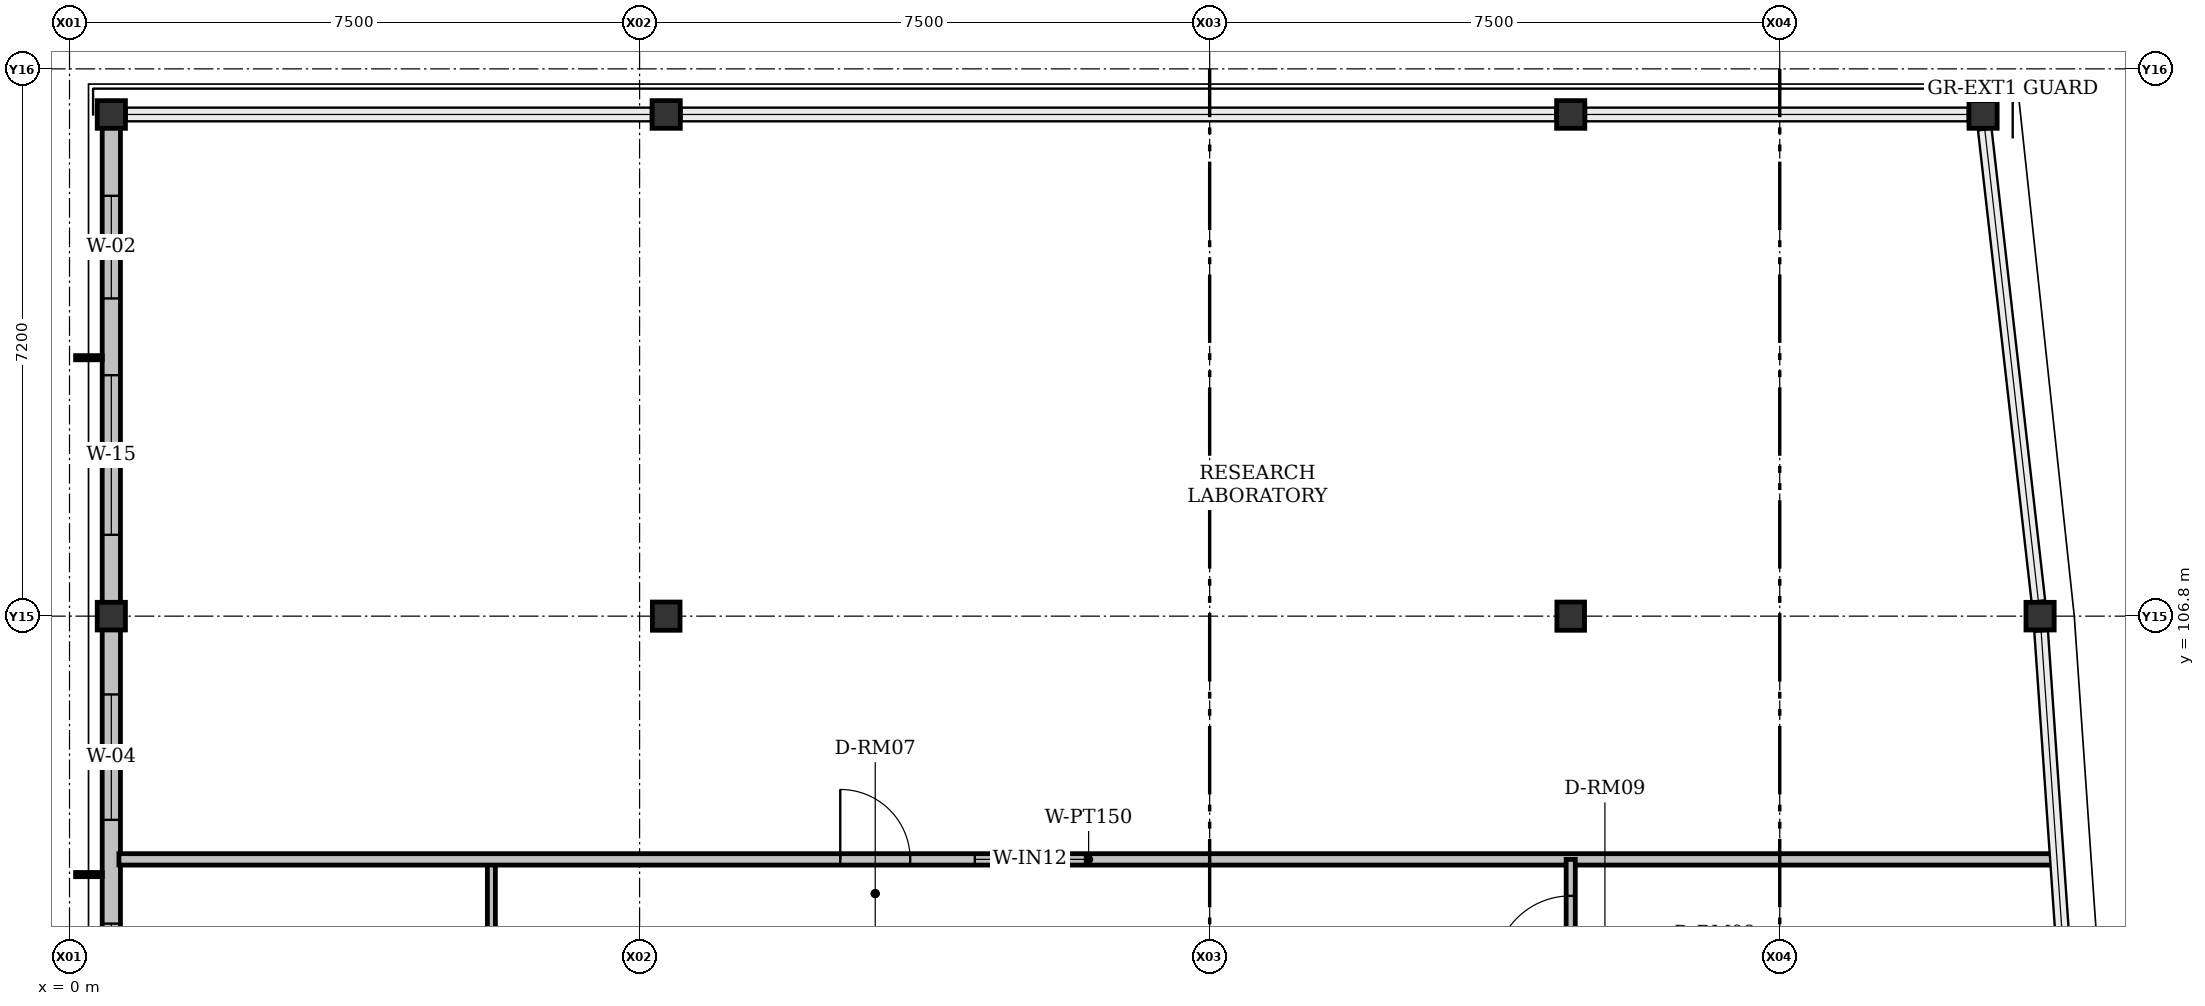
"""IFC4 building model, lengths in metres.
Left out: names, types, materials, properties, quantities, classifications, styles, units other than length and angle.
Written with IfcOpenShell. Run it as: python <this file> out.ifc"""

import sys

from ifc_helpers import new_model, si_unit, direction, frame, frame_2d, origin, origin_2d, place, context, subcontext, project, spatial, rectangle, i_section, extrude, element, fill, save


model = new_model("IFC4")
c1 = context("Model", 3, precision=1e-05, world=origin(), true_north=direction((0.0, 1.0)))
c2 = subcontext(c1, "Body", "Model", "MODEL_VIEW")
j1 = project(units=[si_unit("LENGTHUNIT", "METRE"), si_unit("PLANEANGLEUNIT", "RADIAN")], contexts=[c1])
p1 = place(None, origin())
s1 = spatial("IfcSite", under=j1, at=p1, CompositionType="ELEMENT")
p2 = place(p1, origin())
s2 = spatial("IfcBuilding", under=s1, at=p2, CompositionType="ELEMENT")
p3 = place(p2, frame((0.0, 0.0, 39.3)))
s3 = spatial("IfcBuildingStorey", under=s2, at=p3, CompositionType="ELEMENT", Elevation=39.3)
for number, where, z_axis, x_axis in (
    (1, (0.55, 106.8, 0.0), (0.0, 0.0, 1.0), (1.0, 0.0, 0.0)),
    (2, (7.85, 106.8, 0.0), (0.0, 0.0, 1.0), (0.0, 1.0, 0.0)),
    (3, (19.75, 106.8, 0.0), (0.0, 0.0, 1.0), (0.0, 1.0, 0.0)),
    (4, (25.925, 106.8, 0.0), (0.0, 0.0, 1.0), (1.0, 0.0, 0.0)),
    (5, (0.55, 113.4, 0.0), (0.0, 0.0, 1.0), (1.0, 0.0, 0.0)),
    (6, (7.85, 113.4, 0.0), (0.0, 0.0, 1.0), (1.0, 0.0, 0.0)),
    (7, (19.75, 113.4, 0.0), (0.0, 0.0, 1.0), (1.0, 0.0, 0.0)),
    (8, (25.175, 113.4, 0.0), (0.0, 0.0, 1.0), (1.0, 0.0, 0.0)),
):
    element("IfcColumn", number, at=place(p3, frame(where, z_axis=z_axis, x_axis=x_axis)), inside=s3, PredefinedType="COLUMN", context=c2, shape_type="SweptSolid", body=[
        extrude(i_section(OverallWidth=0.371, OverallDepth=0.364, WebThickness=0.013, FlangeThickness=0.022, FilletRadius=0.015, at=origin_2d()), origin(), (0.0, 0.0, 1.0), 4.2),
    ])
p4 = place(p3, frame((0.55, 99.6, 0.0), z_axis=(0.0, 0.0, 1.0), x_axis=(0.0, 1.0, 0.0)))
e9 = element("IfcWall", 9, at=p4, inside=s3, PredefinedType="SOLIDWALL", context=c2, shape_type="SweptSolid", body=[
    extrude(rectangle(XDim=7.2, YDim=0.24, at=frame_2d((3.6, 0.0))), origin(), (0.0, 0.0, 1.0), 3.577),
])
p5 = place(p4, frame((1.355, 0.0, 0.92)))
e10 = element("IfcOpeningElement", 10, at=p5, cuts=e9, PredefinedType="OPENING", context=c2, shape_type="SweptSolid", body=[
    extrude(rectangle(XDim=1.8, YDim=1.7, at=frame_2d((0.9, 0.85))), frame((0.0, 0.12, 0.0), z_axis=(0.0, -1.0, 0.0), x_axis=(1.0, 0.0, 0.0)), (0.0, 0.0, 1.0), 0.24),
])
p6 = place(p4, frame((4.52, 0.0, 0.92)))
e11 = element("IfcOpeningElement", 11, at=p6, cuts=e9, PredefinedType="OPENING", context=c2, shape_type="SweptSolid", body=[
    extrude(rectangle(XDim=1.65, YDim=1.4, at=frame_2d((0.825, 0.7))), frame((0.0, 0.12, 0.0), z_axis=(0.0, -1.0, 0.0), x_axis=(1.0, 0.0, 0.0)), (0.0, 0.0, 1.0), 0.24),
])
p7 = place(p3, frame((0.55, 106.8, 0.0), z_axis=(0.0, 0.0, 1.0), x_axis=(0.0, 1.0, 0.0)))
e12 = element("IfcWall", 12, at=p7, inside=s3, PredefinedType="SOLIDWALL", context=c2, shape_type="SweptSolid", body=[
    extrude(rectangle(XDim=6.6, YDim=0.24, at=frame_2d((3.3, 0.0))), origin(), (0.0, 0.0, 1.0), 3.577),
])
p8 = place(p7, frame((1.07, 0.0, 0.92)))
e13 = element("IfcOpeningElement", 13, at=p8, cuts=e12, PredefinedType="OPENING", context=c2, shape_type="SweptSolid", body=[
    extrude(rectangle(XDim=2.1, YDim=1.7, at=frame_2d((1.05, 0.85))), frame((0.0, 0.12, 0.0), z_axis=(0.0, -1.0, 0.0), x_axis=(1.0, 0.0, 0.0)), (0.0, 0.0, 1.0), 0.24),
])
p9 = place(p7, frame((4.18, 0.0, 0.92)))
e14 = element("IfcOpeningElement", 14, at=p9, cuts=e12, PredefinedType="OPENING", context=c2, shape_type="SweptSolid", body=[
    extrude(rectangle(XDim=1.35, YDim=1.4, at=frame_2d((0.675, 0.7))), frame((0.0, 0.12, 0.0), z_axis=(0.0, -1.0, 0.0), x_axis=(1.0, 0.0, 0.0)), (0.0, 0.0, 1.0), 0.24),
])
p10 = place(p3, frame((5.55, 92.4, 0.0), z_axis=(0.0, 0.0, 1.0), x_axis=(0.0, 1.0, 0.0)))
e15 = element("IfcWall", 15, at=p10, inside=s3, PredefinedType="PARTITIONING", context=c2, shape_type="SweptSolid", body=[
    extrude(rectangle(XDim=11.2, YDim=0.105, at=frame_2d((5.6, 0.0))), origin(), (0.0, 0.0, 1.0), 3.451),
])
p11 = place(p10, frame((5.06, 0.0, 0.0)))
e16 = element("IfcOpeningElement", 16, at=p11, cuts=e15, PredefinedType="OPENING", context=c2, shape_type="SweptSolid", body=[
    extrude(rectangle(XDim=1.08, YDim=2.1, at=frame_2d((0.54, 1.05))), frame((0.0, 0.052, 0.0), z_axis=(0.0, -1.0, 0.0), x_axis=(1.0, 0.0, 0.0)), (0.0, 0.0, 1.0), 0.105),
])
p12 = place(p10, frame((6.99, 0.0, 0.92)))
e17 = element("IfcOpeningElement", 17, at=p12, cuts=e15, PredefinedType="OPENING", context=c2, shape_type="SweptSolid", body=[
    extrude(rectangle(XDim=1.3, YDim=1.3, at=frame_2d((0.65, 0.65))), frame((0.0, 0.052, 0.0), z_axis=(0.0, -1.0, 0.0), x_axis=(1.0, 0.0, 0.0)), (0.0, 0.0, 1.0), 0.105),
])
p13 = place(p3, frame((0.65, 103.6, 0.0), z_axis=(0.0, 0.0, 1.0), x_axis=(1.0, 0.0, 0.0)))
e18 = element("IfcWall", 18, at=p13, inside=s3, PredefinedType="PARTITIONING", context=c2, shape_type="SweptSolid", body=[
    extrude(rectangle(XDim=25.515, YDim=0.15, at=frame_2d((12.758, 0.0))), origin(), (0.0, 0.0, 1.0), 3.527),
])
p14 = place(p13, frame((9.49, 0.0, 0.0)))
e19 = element("IfcOpeningElement", 19, at=p14, cuts=e18, PredefinedType="OPENING", context=c2, shape_type="SweptSolid", body=[
    extrude(rectangle(XDim=0.92, YDim=2.15, at=frame_2d((0.46, 1.075))), frame((0.0, 0.075, 0.0), z_axis=(0.0, -1.0, 0.0), x_axis=(1.0, 0.0, 0.0)), (0.0, 0.0, 1.0), 0.15),
])
p15 = place(p13, frame((11.26, 0.0, 0.92)))
e20 = element("IfcOpeningElement", 20, at=p15, cuts=e18, PredefinedType="OPENING", context=c2, shape_type="SweptSolid", body=[
    extrude(rectangle(XDim=1.45, YDim=1.3, at=frame_2d((0.725, 0.65))), frame((0.0, 0.075, 0.0), z_axis=(0.0, -1.0, 0.0), x_axis=(1.0, 0.0, 0.0)), (0.0, 0.0, 1.0), 0.15),
])
p16 = place(p3, frame((19.75, 99.777, 0.0), z_axis=(0.0, 0.0, 1.0), x_axis=(0.0, 1.0, 0.0)))
e21 = element("IfcWall", 21, at=p16, inside=s3, PredefinedType="PARTITIONING", context=c2, shape_type="SweptSolid", body=[
    extrude(rectangle(XDim=3.823, YDim=0.12, at=frame_2d((1.912, 0.0))), origin(), (0.0, 0.0, 1.0), 3.527),
])
p17 = place(p16, frame((2.343, 0.0, 0.0)))
e22 = element("IfcOpeningElement", 22, at=p17, cuts=e21, PredefinedType="OPENING", context=c2, shape_type="SweptSolid", body=[
    extrude(rectangle(XDim=1.0, YDim=2.15, at=frame_2d((0.5, 1.075))), frame((0.0, 0.06, 0.0), z_axis=(0.0, -1.0, 0.0), x_axis=(1.0, 0.0, 0.0)), (0.0, 0.0, 1.0), 0.12),
])
p18 = place(p5, origin())
e23 = element("IfcWindow", 23, at=p18, inside=s3, PartitioningType="DOUBLE_PANEL_VERTICAL", PredefinedType="WINDOW", context=c2, shape_type="SweptSolid", body=[
    extrude(rectangle(XDim=1.8, YDim=1.7, at=frame_2d((0.9, 0.85))), frame((0.0, 0.03, 0.0), z_axis=(0.0, -1.0, 0.0), x_axis=(1.0, 0.0, 0.0)), (0.0, 0.0, 1.0), 0.06),
])
fill(e10, e23)
p19 = place(p6, origin())
e24 = element("IfcWindow", 24, at=p19, inside=s3, PartitioningType="DOUBLE_PANEL_VERTICAL", PredefinedType="WINDOW", context=c2, shape_type="SweptSolid", body=[
    extrude(rectangle(XDim=1.65, YDim=1.4, at=frame_2d((0.825, 0.7))), frame((0.0, 0.03, 0.0), z_axis=(0.0, -1.0, 0.0), x_axis=(1.0, 0.0, 0.0)), (0.0, 0.0, 1.0), 0.06),
])
fill(e11, e24)
p20 = place(p8, origin())
e25 = element("IfcWindow", 25, at=p20, inside=s3, PartitioningType="DOUBLE_PANEL_VERTICAL", PredefinedType="WINDOW", context=c2, shape_type="SweptSolid", body=[
    extrude(rectangle(XDim=2.1, YDim=1.7, at=frame_2d((1.05, 0.85))), frame((0.0, 0.03, 0.0), z_axis=(0.0, -1.0, 0.0), x_axis=(1.0, 0.0, 0.0)), (0.0, 0.0, 1.0), 0.06),
])
fill(e13, e25)
p21 = place(p9, origin())
e26 = element("IfcWindow", 26, at=p21, inside=s3, PartitioningType="SINGLE_PANEL", PredefinedType="WINDOW", context=c2, shape_type="SweptSolid", body=[
    extrude(rectangle(XDim=1.35, YDim=1.4, at=frame_2d((0.675, 0.7))), frame((0.0, 0.03, 0.0), z_axis=(0.0, -1.0, 0.0), x_axis=(1.0, 0.0, 0.0)), (0.0, 0.0, 1.0), 0.06),
])
fill(e14, e26)
p22 = place(p14, origin())
e27 = element("IfcDoor", 27, at=p22, inside=s3, OperationType="SINGLE_SWING_LEFT", PredefinedType="DOOR", context=c2, shape_type="SweptSolid", body=[
    extrude(rectangle(XDim=0.92, YDim=2.15, at=frame_2d((0.46, 1.075))), frame((0.0, 0.025, 0.0), z_axis=(0.0, -1.0, 0.0), x_axis=(1.0, 0.0, 0.0)), (0.0, 0.0, 1.0), 0.05),
])
fill(e19, e27)
p23 = place(p15, origin())
e28 = element("IfcWindow", 28, at=p23, inside=s3, PartitioningType="SINGLE_PANEL", PredefinedType="WINDOW", context=c2, shape_type="SweptSolid", body=[
    extrude(rectangle(XDim=1.45, YDim=1.3, at=frame_2d((0.725, 0.65))), frame((0.0, 0.03, 0.0), z_axis=(0.0, -1.0, 0.0), x_axis=(1.0, 0.0, 0.0)), (0.0, 0.0, 1.0), 0.06),
])
fill(e20, e28)
p24 = place(p17, origin())
e29 = element("IfcDoor", 29, at=p24, inside=s3, OperationType="SINGLE_SWING_LEFT", PredefinedType="DOOR", context=c2, shape_type="SweptSolid", body=[
    extrude(rectangle(XDim=1.0, YDim=2.15, at=frame_2d((0.5, 1.075))), frame((0.0, 0.025, 0.0), z_axis=(0.0, -1.0, 0.0), x_axis=(1.0, 0.0, 0.0)), (0.0, 0.0, 1.0), 0.05),
])
fill(e22, e29)
save(model, sys.argv[1])
